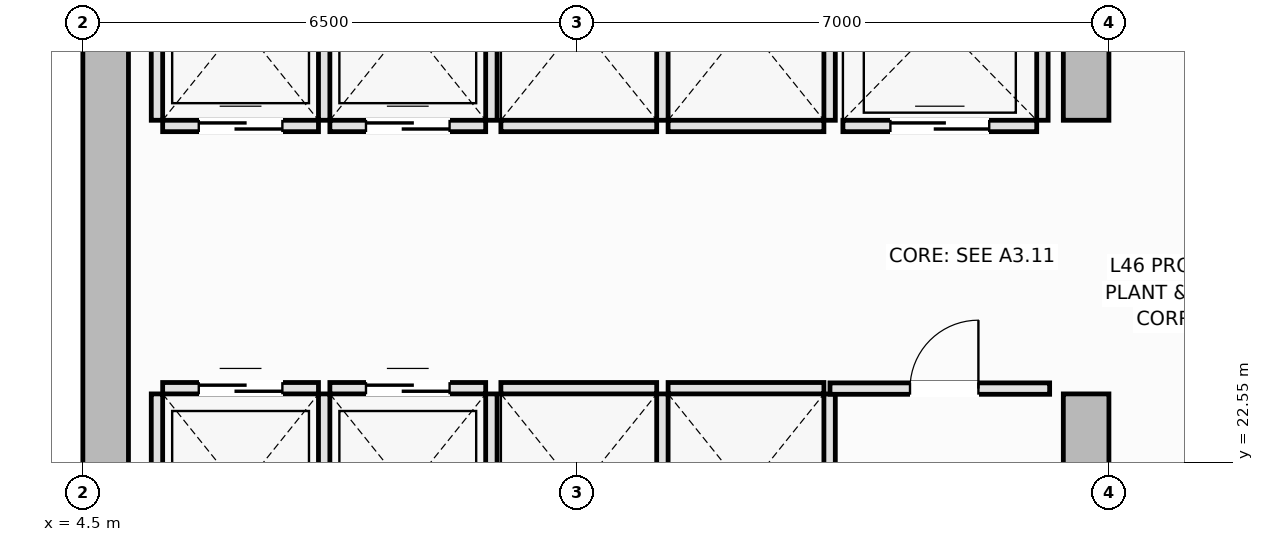
"""IFC4 building model, lengths in metres.
Left out: names, types, materials, properties, quantities, classifications, styles, units other than length and angle.
Written with IfcOpenShell. Run it as: python <this file> out.ifc"""

import sys

from ifc_helpers import new_model, si_unit, direction, frame, frame_2d, origin, place, context, subcontext, project, spatial, rectangle, extrude, element, fill, save


model = new_model("IFC4")
c1 = context("Model", 3, precision=1e-05, world=origin(), true_north=direction((0.0, 1.0)))
c2 = subcontext(c1, "Body", "Model", "MODEL_VIEW")
j1 = project(units=[si_unit("LENGTHUNIT", "METRE"), si_unit("PLANEANGLEUNIT", "RADIAN")], contexts=[c1])
p1 = place(None, origin())
s1 = spatial("IfcSite", under=j1, at=p1, CompositionType="ELEMENT")
p2 = place(p1, origin())
s2 = spatial("IfcBuilding", under=s1, at=p2, CompositionType="ELEMENT")
p3 = place(p2, frame((0.0, 0.0, 173.25)))
s3 = spatial("IfcBuildingStorey", under=s2, at=p3, CompositionType="ELEMENT", Elevation=173.25)
p4 = place(p3, frame((4.8, 14.6, 0.0), z_axis=(0.0, 0.0, 1.0), x_axis=(0.0, 1.0, 0.0)))
e1 = element("IfcWall", 1, at=p4, inside=s3, PredefinedType="SHEAR", context=c2, shape_type="SweptSolid", body=[
    extrude(rectangle(XDim=21.3, YDim=0.6, at=frame_2d((10.65, 0.0))), origin(), (0.0, 0.0, 1.0), 4.8),
])
p5 = place(p3, frame((17.7, 14.6, 0.0), z_axis=(0.0, 0.0, 1.0), x_axis=(0.0, 1.0, 0.0)))
e2 = element("IfcWall", 2, at=p5, inside=s3, PredefinedType="SHEAR", context=c2, shape_type="SweptSolid", body=[
    extrude(rectangle(XDim=8.85, YDim=0.6, at=frame_2d((4.425, 0.0))), origin(), (0.0, 0.0, 1.0), 4.8),
])
p6 = place(p5, frame((4.3, 0.0, 0.0)))
e3 = element("IfcOpeningElement", 3, at=p6, cuts=e2, PredefinedType="OPENING", context=c2, shape_type="SweptSolid", body=[
    extrude(rectangle(XDim=1.1, YDim=2.15, at=frame_2d((0.55, 1.075))), frame((0.0, 0.31, 0.0), z_axis=(0.0, -1.0, 0.0), x_axis=(1.0, 0.0, 0.0)), (0.0, 0.0, 1.0), 0.62),
])
p7 = place(p3, frame((17.7, 27.05, 0.0), z_axis=(0.0, 0.0, 1.0), x_axis=(0.0, 1.0, 0.0)))
e4 = element("IfcWall", 4, at=p7, inside=s3, PredefinedType="SHEAR", context=c2, shape_type="SweptSolid", body=[
    extrude(rectangle(XDim=8.85, YDim=0.6, at=frame_2d((4.425, 0.0))), origin(), (0.0, 0.0, 1.0), 4.8),
])
p8 = place(p7, frame((3.45, 0.0, 0.0)))
e5 = element("IfcOpeningElement", 5, at=p8, cuts=e4, PredefinedType="OPENING", context=c2, shape_type="SweptSolid", body=[
    extrude(rectangle(XDim=1.1, YDim=2.15, at=frame_2d((0.55, 1.075))), frame((0.0, 0.31, 0.0), z_axis=(0.0, -1.0, 0.0), x_axis=(1.0, 0.0, 0.0)), (0.0, 0.0, 1.0), 0.62),
])
p9 = place(p3, frame((5.55, 23.525, 0.0), z_axis=(0.0, 0.0, 1.0), x_axis=(1.0, 0.0, 0.0)))
e6 = element("IfcWall", 6, at=p9, inside=s3, PredefinedType="PARTITIONING", context=c2, shape_type="SweptSolid", body=[
    extrude(rectangle(XDim=2.05, YDim=0.15, at=frame_2d((1.025, 0.0))), origin(), (0.0, 0.0, 1.0), 4.6),
])
p10 = place(p9, frame((0.475, 0.0, 0.0)))
e7 = element("IfcOpeningElement", 7, at=p10, cuts=e6, PredefinedType="OPENING", context=c2, shape_type="SweptSolid", body=[
    extrude(rectangle(XDim=1.1, YDim=2.2, at=frame_2d((0.55, 1.1))), frame((0.0, 0.085, 0.0), z_axis=(0.0, -1.0, 0.0), x_axis=(1.0, 0.0, 0.0)), (0.0, 0.0, 1.0), 0.17),
])
for number, where, z_axis, x_axis in (
    (8, (5.475, 20.9, 0.0), (0.0, 0.0, 1.0), (0.0, 1.0, 0.0)),
    (9, (7.675, 20.9, 0.0), (0.0, 0.0, 1.0), (0.0, 1.0, 0.0)),
):
    element("IfcWall", number, at=place(p3, frame(where, z_axis=z_axis, x_axis=x_axis)), inside=s3, PredefinedType="PARTITIONING", context=c2, shape_type="SweptSolid", body=[
        extrude(rectangle(XDim=2.55, YDim=0.15, at=frame_2d((1.275, 0.0))), origin(), (0.0, 0.0, 1.0), 4.6),
    ])
p11 = place(p3, frame((7.75, 23.525, 0.0), z_axis=(0.0, 0.0, 1.0), x_axis=(1.0, 0.0, 0.0)))
e10 = element("IfcWall", 10, at=p11, inside=s3, PredefinedType="PARTITIONING", context=c2, shape_type="SweptSolid", body=[
    extrude(rectangle(XDim=2.05, YDim=0.15, at=frame_2d((1.025, 0.0))), origin(), (0.0, 0.0, 1.0), 4.6),
])
p12 = place(p11, frame((0.475, 0.0, 0.0)))
e11 = element("IfcOpeningElement", 11, at=p12, cuts=e10, PredefinedType="OPENING", context=c2, shape_type="SweptSolid", body=[
    extrude(rectangle(XDim=1.1, YDim=2.2, at=frame_2d((0.55, 1.1))), frame((0.0, 0.085, 0.0), z_axis=(0.0, -1.0, 0.0), x_axis=(1.0, 0.0, 0.0)), (0.0, 0.0, 1.0), 0.17),
])
p13 = place(p3, frame((9.875, 20.9, 0.0), z_axis=(0.0, 0.0, 1.0), x_axis=(0.0, 1.0, 0.0)))
e12 = element("IfcWall", 12, at=p13, inside=s3, PredefinedType="PARTITIONING", context=c2, shape_type="SweptSolid", body=[
    extrude(rectangle(XDim=2.55, YDim=0.15, at=frame_2d((1.275, 0.0))), origin(), (0.0, 0.0, 1.0), 4.6),
])
p14 = place(p3, frame((5.55, 26.975, 0.0), z_axis=(0.0, 0.0, 1.0), x_axis=(1.0, 0.0, 0.0)))
e13 = element("IfcWall", 13, at=p14, inside=s3, PredefinedType="PARTITIONING", context=c2, shape_type="SweptSolid", body=[
    extrude(rectangle(XDim=2.05, YDim=0.15, at=frame_2d((1.025, 0.0))), origin(), (0.0, 0.0, 1.0), 4.6),
])
p15 = place(p14, frame((0.475, 0.0, 0.0)))
e14 = element("IfcOpeningElement", 14, at=p15, cuts=e13, PredefinedType="OPENING", context=c2, shape_type="SweptSolid", body=[
    extrude(rectangle(XDim=1.1, YDim=2.2, at=frame_2d((0.55, 1.1))), frame((0.0, 0.085, 0.0), z_axis=(0.0, -1.0, 0.0), x_axis=(1.0, 0.0, 0.0)), (0.0, 0.0, 1.0), 0.17),
])
for number, where, z_axis, x_axis in (
    (15, (5.475, 27.05, 0.0), (0.0, 0.0, 1.0), (0.0, 1.0, 0.0)),
    (16, (7.675, 27.05, 0.0), (0.0, 0.0, 1.0), (0.0, 1.0, 0.0)),
):
    element("IfcWall", number, at=place(p3, frame(where, z_axis=z_axis, x_axis=x_axis)), inside=s3, PredefinedType="PARTITIONING", context=c2, shape_type="SweptSolid", body=[
        extrude(rectangle(XDim=2.55, YDim=0.15, at=frame_2d((1.275, 0.0))), origin(), (0.0, 0.0, 1.0), 4.6),
    ])
p16 = place(p3, frame((7.75, 26.975, 0.0), z_axis=(0.0, 0.0, 1.0), x_axis=(1.0, 0.0, 0.0)))
e17 = element("IfcWall", 17, at=p16, inside=s3, PredefinedType="PARTITIONING", context=c2, shape_type="SweptSolid", body=[
    extrude(rectangle(XDim=2.05, YDim=0.15, at=frame_2d((1.025, 0.0))), origin(), (0.0, 0.0, 1.0), 4.6),
])
p17 = place(p16, frame((0.475, 0.0, 0.0)))
e18 = element("IfcOpeningElement", 18, at=p17, cuts=e17, PredefinedType="OPENING", context=c2, shape_type="SweptSolid", body=[
    extrude(rectangle(XDim=1.1, YDim=2.2, at=frame_2d((0.55, 1.1))), frame((0.0, 0.085, 0.0), z_axis=(0.0, -1.0, 0.0), x_axis=(1.0, 0.0, 0.0)), (0.0, 0.0, 1.0), 0.17),
])
p18 = place(p3, frame((9.875, 27.05, 0.0), z_axis=(0.0, 0.0, 1.0), x_axis=(0.0, 1.0, 0.0)))
e19 = element("IfcWall", 19, at=p18, inside=s3, PredefinedType="PARTITIONING", context=c2, shape_type="SweptSolid", body=[
    extrude(rectangle(XDim=2.55, YDim=0.15, at=frame_2d((1.275, 0.0))), origin(), (0.0, 0.0, 1.0), 4.6),
])
p19 = place(p3, frame((10.0, 23.525, 0.0), z_axis=(0.0, 0.0, 1.0), x_axis=(1.0, 0.0, 0.0)))
e20 = element("IfcWall", 20, at=p19, inside=s3, PredefinedType="PARTITIONING", context=c2, shape_type="SweptSolid", body=[
    extrude(rectangle(XDim=2.05, YDim=0.15, at=frame_2d((1.025, 0.0))), origin(), (0.0, 0.0, 1.0), 4.6),
])
p20 = place(p3, frame((12.125, 20.9, 0.0), z_axis=(0.0, 0.0, 1.0), x_axis=(0.0, 1.0, 0.0)))
e21 = element("IfcWall", 21, at=p20, inside=s3, PredefinedType="PARTITIONING", context=c2, shape_type="SweptSolid", body=[
    extrude(rectangle(XDim=2.55, YDim=0.15, at=frame_2d((1.275, 0.0))), origin(), (0.0, 0.0, 1.0), 4.6),
])
p21 = place(p3, frame((12.2, 23.525, 0.0), z_axis=(0.0, 0.0, 1.0), x_axis=(1.0, 0.0, 0.0)))
e22 = element("IfcWall", 22, at=p21, inside=s3, PredefinedType="PARTITIONING", context=c2, shape_type="SweptSolid", body=[
    extrude(rectangle(XDim=2.05, YDim=0.15, at=frame_2d((1.025, 0.0))), origin(), (0.0, 0.0, 1.0), 4.6),
])
p22 = place(p3, frame((14.325, 20.9, 0.0), z_axis=(0.0, 0.0, 1.0), x_axis=(0.0, 1.0, 0.0)))
e23 = element("IfcWall", 23, at=p22, inside=s3, PredefinedType="PARTITIONING", context=c2, shape_type="SweptSolid", body=[
    extrude(rectangle(XDim=2.55, YDim=0.15, at=frame_2d((1.275, 0.0))), origin(), (0.0, 0.0, 1.0), 4.6),
])
p23 = place(p3, frame((10.0, 26.975, 0.0), z_axis=(0.0, 0.0, 1.0), x_axis=(1.0, 0.0, 0.0)))
e24 = element("IfcWall", 24, at=p23, inside=s3, PredefinedType="PARTITIONING", context=c2, shape_type="SweptSolid", body=[
    extrude(rectangle(XDim=2.05, YDim=0.15, at=frame_2d((1.025, 0.0))), origin(), (0.0, 0.0, 1.0), 4.6),
])
p24 = place(p3, frame((12.125, 27.05, 0.0), z_axis=(0.0, 0.0, 1.0), x_axis=(0.0, 1.0, 0.0)))
e25 = element("IfcWall", 25, at=p24, inside=s3, PredefinedType="PARTITIONING", context=c2, shape_type="SweptSolid", body=[
    extrude(rectangle(XDim=2.55, YDim=0.15, at=frame_2d((1.275, 0.0))), origin(), (0.0, 0.0, 1.0), 4.6),
])
p25 = place(p3, frame((12.2, 26.975, 0.0), z_axis=(0.0, 0.0, 1.0), x_axis=(1.0, 0.0, 0.0)))
e26 = element("IfcWall", 26, at=p25, inside=s3, PredefinedType="PARTITIONING", context=c2, shape_type="SweptSolid", body=[
    extrude(rectangle(XDim=2.05, YDim=0.15, at=frame_2d((1.025, 0.0))), origin(), (0.0, 0.0, 1.0), 4.6),
])
p26 = place(p3, frame((14.325, 27.05, 0.0), z_axis=(0.0, 0.0, 1.0), x_axis=(0.0, 1.0, 0.0)))
e27 = element("IfcWall", 27, at=p26, inside=s3, PredefinedType="PARTITIONING", context=c2, shape_type="SweptSolid", body=[
    extrude(rectangle(XDim=2.55, YDim=0.15, at=frame_2d((1.275, 0.0))), origin(), (0.0, 0.0, 1.0), 4.6),
])
p27 = place(p3, frame((14.5, 26.975, 0.0), z_axis=(0.0, 0.0, 1.0), x_axis=(1.0, 0.0, 0.0)))
e28 = element("IfcWall", 28, at=p27, inside=s3, PredefinedType="PARTITIONING", context=c2, shape_type="SweptSolid", body=[
    extrude(rectangle(XDim=2.55, YDim=0.15, at=frame_2d((1.275, 0.0))), origin(), (0.0, 0.0, 1.0), 4.6),
])
p28 = place(p27, frame((0.625, 0.0, 0.0)))
e29 = element("IfcOpeningElement", 29, at=p28, cuts=e28, PredefinedType="OPENING", context=c2, shape_type="SweptSolid", body=[
    extrude(rectangle(XDim=1.3, YDim=2.2, at=frame_2d((0.65, 1.1))), frame((0.0, 0.085, 0.0), z_axis=(0.0, -1.0, 0.0), x_axis=(1.0, 0.0, 0.0)), (0.0, 0.0, 1.0), 0.17),
])
p29 = place(p3, frame((17.125, 27.05, 0.0), z_axis=(0.0, 0.0, 1.0), x_axis=(0.0, 1.0, 0.0)))
e30 = element("IfcWall", 30, at=p29, inside=s3, PredefinedType="PARTITIONING", context=c2, shape_type="SweptSolid", body=[
    extrude(rectangle(XDim=2.6, YDim=0.15, at=frame_2d((1.3, 0.0))), origin(), (0.0, 0.0, 1.0), 4.6),
])
p30 = place(p3, frame((14.33, 23.52, 0.0), z_axis=(0.0, 0.0, 1.0), x_axis=(1.0, 0.0, 0.0)))
e31 = element("IfcWall", 31, at=p30, inside=s3, PredefinedType="PARTITIONING", context=c2, shape_type="SweptSolid", body=[
    extrude(rectangle(XDim=2.89, YDim=0.15, at=frame_2d((1.445, 0.0))), origin(), (0.0, 0.0, 1.0), 4.6),
])
p31 = place(p30, frame((1.053, 0.0, 0.0)))
e32 = element("IfcOpeningElement", 32, at=p31, cuts=e31, PredefinedType="OPENING", context=c2, shape_type="SweptSolid", body=[
    extrude(rectangle(XDim=0.9, YDim=2.1, at=frame_2d((0.45, 1.05))), frame((0.0, 0.085, 0.0), z_axis=(0.0, -1.0, 0.0), x_axis=(1.0, 0.0, 0.0)), (0.0, 0.0, 1.0), 0.17),
])
p32 = place(p10, origin())
e33 = element("IfcDoor", 33, at=p32, inside=s3, OperationType="DOUBLE_DOOR_SLIDING", PredefinedType="DOOR", context=c2, shape_type="SweptSolid", body=[
    extrude(rectangle(XDim=1.1, YDim=2.2, at=frame_2d((0.55, 1.1))), frame((0.0, 0.025, 0.0), z_axis=(0.0, -1.0, 0.0), x_axis=(1.0, 0.0, 0.0)), (0.0, 0.0, 1.0), 0.05),
])
fill(e7, e33)
p33 = place(p12, origin())
e34 = element("IfcDoor", 34, at=p33, inside=s3, OperationType="DOUBLE_DOOR_SLIDING", PredefinedType="DOOR", context=c2, shape_type="SweptSolid", body=[
    extrude(rectangle(XDim=1.1, YDim=2.2, at=frame_2d((0.55, 1.1))), frame((0.0, 0.025, 0.0), z_axis=(0.0, -1.0, 0.0), x_axis=(1.0, 0.0, 0.0)), (0.0, 0.0, 1.0), 0.05),
])
fill(e11, e34)
p34 = place(p15, origin())
e35 = element("IfcDoor", 35, at=p34, inside=s3, OperationType="DOUBLE_DOOR_SLIDING", PredefinedType="DOOR", context=c2, shape_type="SweptSolid", body=[
    extrude(rectangle(XDim=1.1, YDim=2.2, at=frame_2d((0.55, 1.1))), frame((0.0, 0.025, 0.0), z_axis=(0.0, -1.0, 0.0), x_axis=(1.0, 0.0, 0.0)), (0.0, 0.0, 1.0), 0.05),
])
fill(e14, e35)
p35 = place(p17, origin())
e36 = element("IfcDoor", 36, at=p35, inside=s3, OperationType="DOUBLE_DOOR_SLIDING", PredefinedType="DOOR", context=c2, shape_type="SweptSolid", body=[
    extrude(rectangle(XDim=1.1, YDim=2.2, at=frame_2d((0.55, 1.1))), frame((0.0, 0.025, 0.0), z_axis=(0.0, -1.0, 0.0), x_axis=(1.0, 0.0, 0.0)), (0.0, 0.0, 1.0), 0.05),
])
fill(e18, e36)
p36 = place(p28, origin())
e37 = element("IfcDoor", 37, at=p36, inside=s3, OperationType="DOUBLE_DOOR_SLIDING", PredefinedType="DOOR", context=c2, shape_type="SweptSolid", body=[
    extrude(rectangle(XDim=1.3, YDim=2.2, at=frame_2d((0.65, 1.1))), frame((0.0, 0.025, 0.0), z_axis=(0.0, -1.0, 0.0), x_axis=(1.0, 0.0, 0.0)), (0.0, 0.0, 1.0), 0.05),
])
fill(e29, e37)
p37 = place(p31, origin())
e38 = element("IfcDoor", 38, at=p37, inside=s3, OperationType="SINGLE_SWING_RIGHT", PredefinedType="DOOR", context=c2, shape_type="SweptSolid", body=[
    extrude(rectangle(XDim=0.9, YDim=2.1, at=frame_2d((0.45, 1.05))), frame((0.0, 0.025, 0.0), z_axis=(0.0, -1.0, 0.0), x_axis=(1.0, 0.0, 0.0)), (0.0, 0.0, 1.0), 0.05),
])
fill(e32, e38)
save(model, sys.argv[1])
